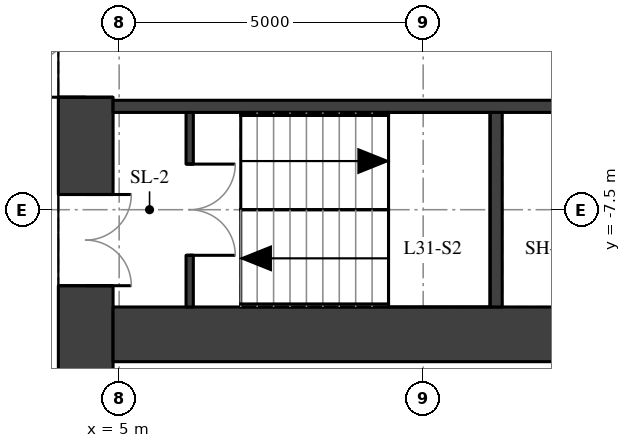
"""IFC4 building model, lengths in metres.
Left out: names, types, materials, properties, quantities, classifications, styles, units other than length and angle.
Written with IfcOpenShell. Run it as: python <this file> out.ifc"""

import sys

from ifc_helpers import new_model, si_unit, direction, frame, frame_2d, origin, place, context, subcontext, project, spatial, rectangle, extrude, element, fill, save


model = new_model("IFC4")
c1 = context("Model", 3, precision=1e-05, world=origin(), true_north=direction((0.0, 1.0)))
c2 = subcontext(c1, "Body", "Model", "MODEL_VIEW")
j1 = project(units=[si_unit("LENGTHUNIT", "METRE"), si_unit("PLANEANGLEUNIT", "RADIAN")], contexts=[c1])
p1 = place(None, origin())
s1 = spatial("IfcSite", under=j1, at=p1, CompositionType="ELEMENT")
p2 = place(p1, origin())
s2 = spatial("IfcBuilding", under=s1, at=p2, CompositionType="ELEMENT")
p3 = place(p2, frame((0.0, 0.0, 112.0)))
s3 = spatial("IfcBuildingStorey", under=s2, at=p3, CompositionType="ELEMENT", Elevation=112.0)
p4 = place(p3, frame((4.45, -11.1, 0.0), z_axis=(0.0, 0.0, 1.0), x_axis=(0.0, 1.0, 0.0)))
e1 = element("IfcWall", 1, at=p4, inside=s3, PredefinedType="SHEAR", context=c2, shape_type="SweptSolid", body=[
    extrude(rectangle(XDim=22.2, YDim=0.9, at=frame_2d((11.1, 0.0))), origin(), (0.0, 0.0, 1.0), 3.02),
])
p5 = place(p4, frame((2.35, 0.0, 0.0)))
e2 = element("IfcOpeningElement", 2, at=p5, cuts=e1, PredefinedType="OPENING", context=c2, shape_type="SweptSolid", body=[
    extrude(rectangle(XDim=1.5, YDim=2.1, at=frame_2d((0.75, 1.05))), frame((0.0, 0.46, 0.0), z_axis=(0.0, -1.0, 0.0), x_axis=(1.0, 0.0, 0.0)), (0.0, 0.0, 1.0), 0.92),
])
p6 = place(p4, frame((5.45, 0.0, 0.0)))
e3 = element("IfcOpeningElement", 3, at=p6, cuts=e1, PredefinedType="OPENING", context=c2, shape_type="SweptSolid", body=[
    extrude(rectangle(XDim=1.8, YDim=2.1, at=frame_2d((0.9, 1.05))), frame((0.0, 0.46, 0.0), z_axis=(0.0, -1.0, 0.0), x_axis=(1.0, 0.0, 0.0)), (0.0, 0.0, 1.0), 0.92),
])
p7 = place(p4, frame((7.95, 0.0, 0.0)))
e4 = element("IfcOpeningElement", 4, at=p7, cuts=e1, PredefinedType="OPENING", context=c2, shape_type="SweptSolid", body=[
    extrude(rectangle(XDim=1.1, YDim=2.1, at=frame_2d((0.55, 1.05))), frame((0.0, 0.46, 0.0), z_axis=(0.0, -1.0, 0.0), x_axis=(1.0, 0.0, 0.0)), (0.0, 0.0, 1.0), 0.92),
])
p8 = place(p4, frame((10.6, 0.0, 0.0)))
e5 = element("IfcOpeningElement", 5, at=p8, cuts=e1, PredefinedType="OPENING", context=c2, shape_type="SweptSolid", body=[
    extrude(rectangle(XDim=1.0, YDim=2.1, at=frame_2d((0.5, 1.05))), frame((0.0, 0.46, 0.0), z_axis=(0.0, -1.0, 0.0), x_axis=(1.0, 0.0, 0.0)), (0.0, 0.0, 1.0), 0.92),
])
p9 = place(p4, frame((13.15, 0.0, 0.0)))
e6 = element("IfcOpeningElement", 6, at=p9, cuts=e1, PredefinedType="OPENING", context=c2, shape_type="SweptSolid", body=[
    extrude(rectangle(XDim=1.1, YDim=2.1, at=frame_2d((0.55, 1.05))), frame((0.0, 0.46, 0.0), z_axis=(0.0, -1.0, 0.0), x_axis=(1.0, 0.0, 0.0)), (0.0, 0.0, 1.0), 0.92),
])
p10 = place(p4, frame((14.95, 0.0, 0.0)))
e7 = element("IfcOpeningElement", 7, at=p10, cuts=e1, PredefinedType="OPENING", context=c2, shape_type="SweptSolid", body=[
    extrude(rectangle(XDim=1.8, YDim=2.1, at=frame_2d((0.9, 1.05))), frame((0.0, 0.46, 0.0), z_axis=(0.0, -1.0, 0.0), x_axis=(1.0, 0.0, 0.0)), (0.0, 0.0, 1.0), 0.92),
])
p11 = place(p4, frame((18.35, 0.0, 0.0)))
e8 = element("IfcOpeningElement", 8, at=p11, cuts=e1, PredefinedType="OPENING", context=c2, shape_type="SweptSolid", body=[
    extrude(rectangle(XDim=1.5, YDim=2.1, at=frame_2d((0.75, 1.05))), frame((0.0, 0.46, 0.0), z_axis=(0.0, -1.0, 0.0), x_axis=(1.0, 0.0, 0.0)), (0.0, 0.0, 1.0), 0.92),
])
p12 = place(p3, frame((4.9, -9.55, 0.0), z_axis=(0.0, 0.0, 1.0), x_axis=(1.0, 0.0, 0.0)))
e9 = element("IfcWall", 9, at=p12, inside=s3, PredefinedType="SHEAR", context=c2, shape_type="SweptSolid", body=[
    extrude(rectangle(XDim=10.2, YDim=0.9, at=frame_2d((5.1, 0.0))), origin(), (0.0, 0.0, 1.0), 3.02),
])
p13 = place(p3, frame((4.9, -5.8, 0.0), z_axis=(0.0, 0.0, 1.0), x_axis=(1.0, 0.0, 0.0)))
e10 = element("IfcWall", 10, at=p13, inside=s3, PredefinedType="SHEAR", context=c2, shape_type="SweptSolid", body=[
    extrude(rectangle(XDim=10.2, YDim=0.2, at=frame_2d((5.1, 0.0))), origin(), (0.0, 0.0, 1.0), 3.02),
])
p14 = place(p3, frame((11.2, -9.1, 0.0), z_axis=(0.0, 0.0, 1.0), x_axis=(0.0, 1.0, 0.0)))
e11 = element("IfcWall", 11, at=p14, inside=s3, PredefinedType="SHEAR", context=c2, shape_type="SweptSolid", body=[
    extrude(rectangle(XDim=3.2, YDim=0.2, at=frame_2d((1.6, 0.0))), origin(), (0.0, 0.0, 1.0), 3.02),
])
p15 = place(p3, frame((6.16, -9.1, 0.0), z_axis=(0.0, 0.0, 1.0), x_axis=(0.0, 1.0, 0.0)))
e12 = element("IfcWall", 12, at=p15, inside=s3, PredefinedType="SHEAR", context=c2, shape_type="SweptSolid", body=[
    extrude(rectangle(XDim=3.2, YDim=0.12, at=frame_2d((1.6, 0.0))), origin(), (0.0, 0.0, 1.0), 3.02),
])
p16 = place(p15, frame((0.85, 0.0, 0.0)))
e13 = element("IfcOpeningElement", 13, at=p16, cuts=e12, PredefinedType="OPENING", context=c2, shape_type="SweptSolid", body=[
    extrude(rectangle(XDim=1.5, YDim=2.1, at=frame_2d((0.75, 1.05))), frame((0.0, 0.07, 0.0), z_axis=(0.0, -1.0, 0.0), x_axis=(1.0, 0.0, 0.0)), (0.0, 0.0, 1.0), 0.14),
])
p17 = place(p5, origin())
e14 = element("IfcDoor", 14, at=p17, inside=s3, OperationType="DOUBLE_DOOR_SINGLE_SWING", PredefinedType="DOOR", context=c2, shape_type="SweptSolid", body=[
    extrude(rectangle(XDim=1.5, YDim=2.1, at=frame_2d((0.75, 1.05))), frame((0.0, 0.025, 0.0), z_axis=(0.0, -1.0, 0.0), x_axis=(1.0, 0.0, 0.0)), (0.0, 0.0, 1.0), 0.05),
])
fill(e2, e14)
p18 = place(p6, origin())
e15 = element("IfcDoor", 15, at=p18, inside=s3, OperationType="DOUBLE_DOOR_SINGLE_SWING", PredefinedType="DOOR", context=c2, shape_type="SweptSolid", body=[
    extrude(rectangle(XDim=1.8, YDim=2.1, at=frame_2d((0.9, 1.05))), frame((0.0, 0.025, 0.0), z_axis=(0.0, -1.0, 0.0), x_axis=(1.0, 0.0, 0.0)), (0.0, 0.0, 1.0), 0.05),
])
fill(e3, e15)
p19 = place(p16, origin())
e16 = element("IfcDoor", 16, at=p19, inside=s3, OperationType="DOUBLE_DOOR_SINGLE_SWING", PredefinedType="DOOR", context=c2, shape_type="SweptSolid", body=[
    extrude(rectangle(XDim=1.5, YDim=2.1, at=frame_2d((0.75, 1.05))), frame((0.0, 0.025, 0.0), z_axis=(0.0, -1.0, 0.0), x_axis=(1.0, 0.0, 0.0)), (0.0, 0.0, 1.0), 0.05),
])
fill(e13, e16)
save(model, sys.argv[1])
